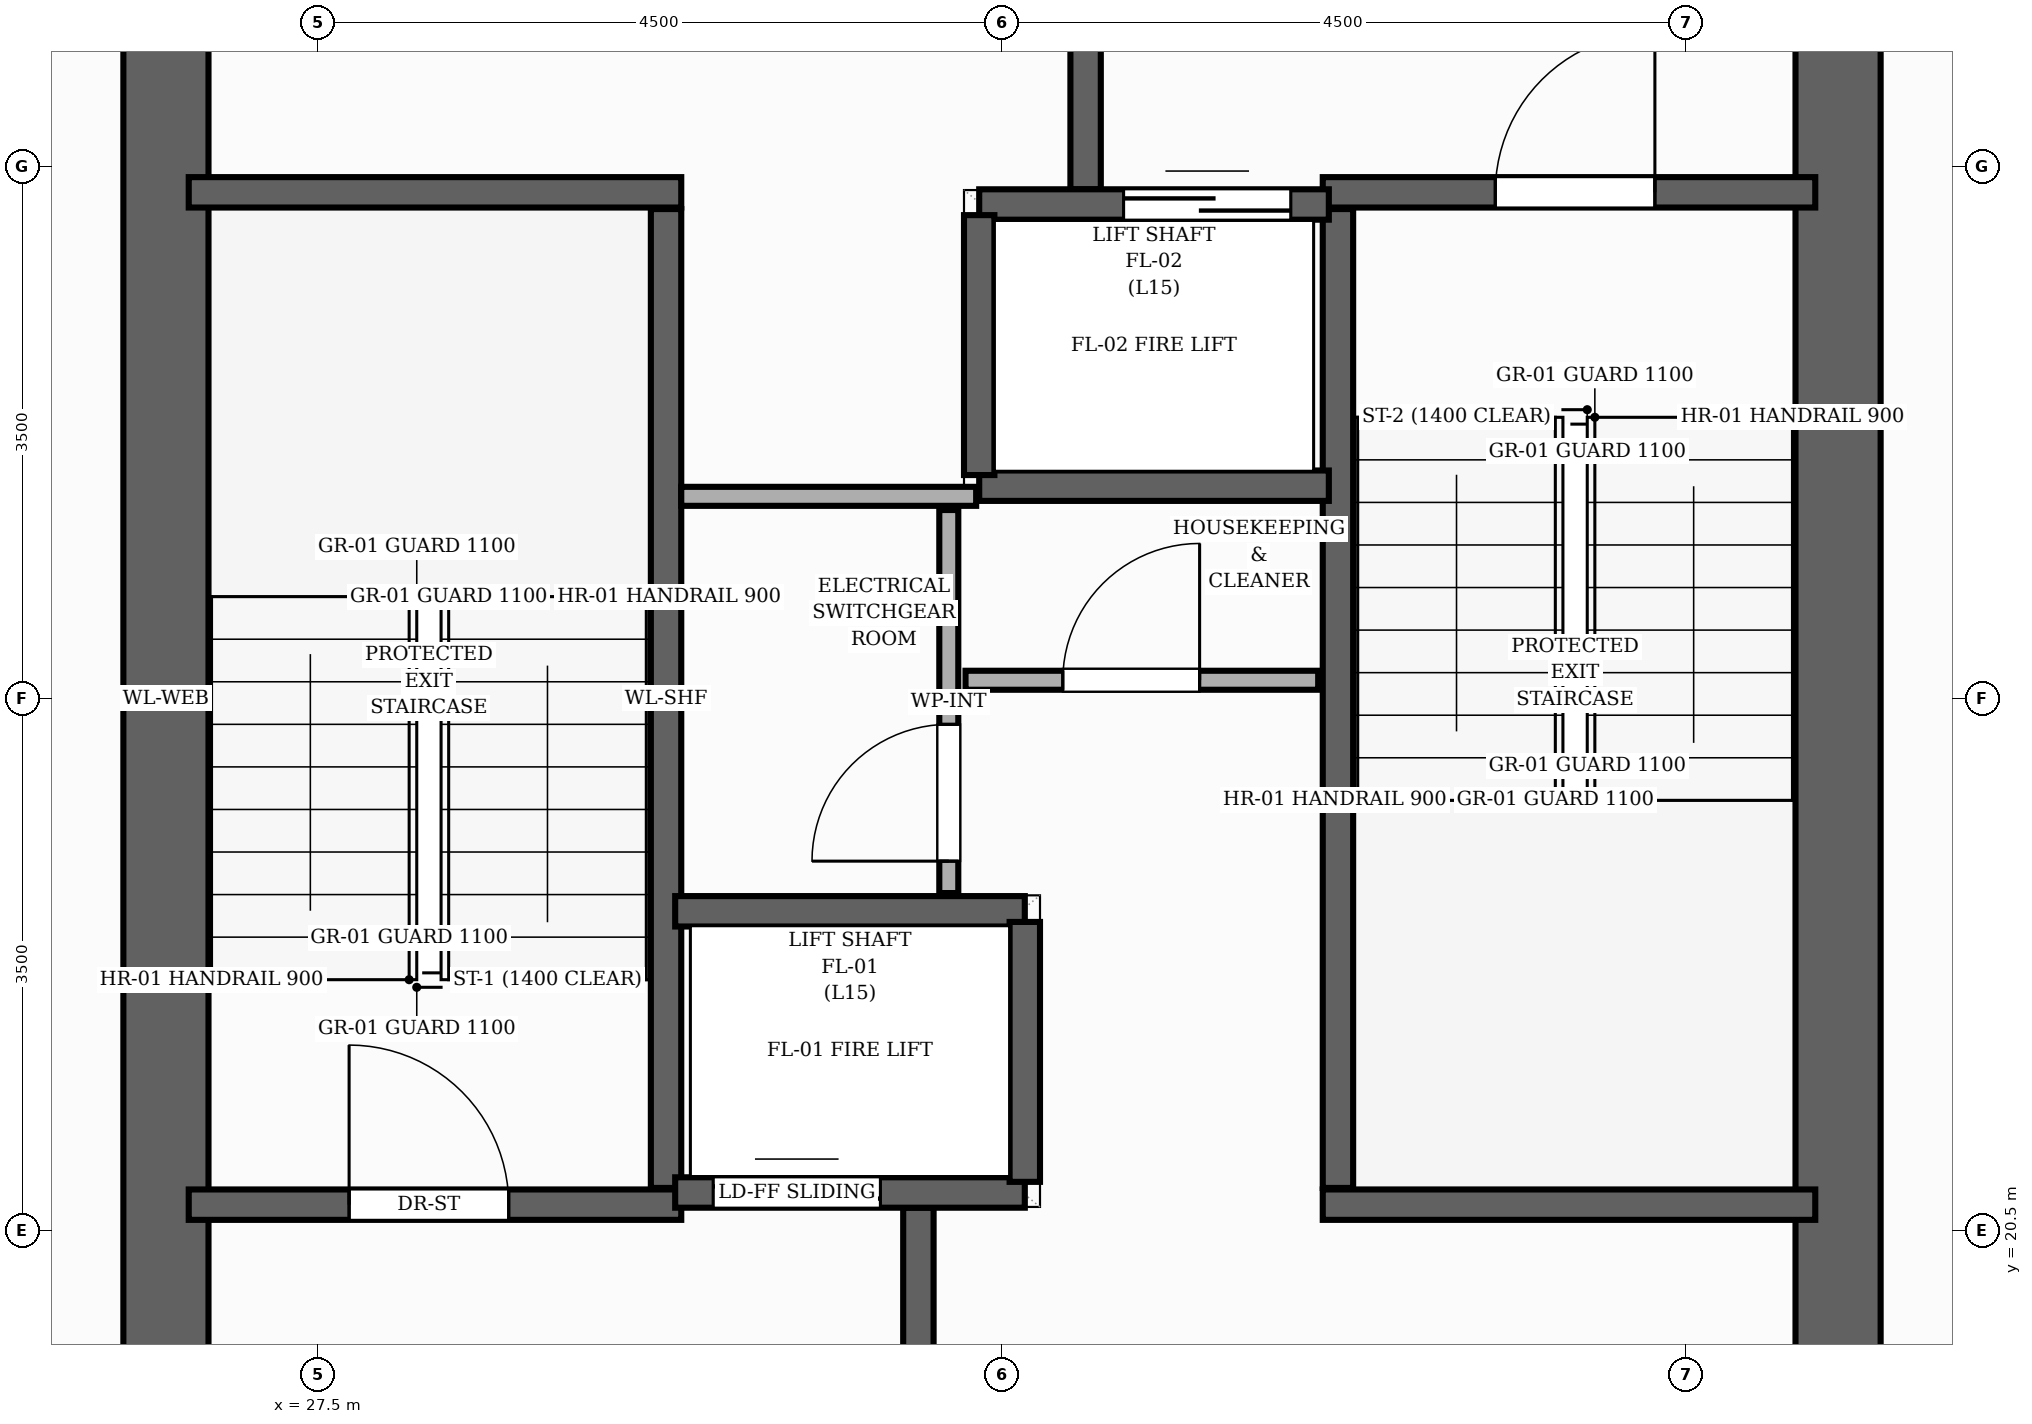
"""IFC4 building model, lengths in metres.
Left out: names, types, materials, properties, quantities, classifications, styles, units other than length and angle.
Written with IfcOpenShell. Run it as: python <this file> out.ifc"""

import sys

from ifc_helpers import new_model, si_unit, direction, frame, frame_2d, origin, place, context, subcontext, project, spatial, rectangle, extrude, element, fill, save


model = new_model("IFC4")
c1 = context("Model", 3, precision=1e-05, world=origin(), true_north=direction((0.0, 1.0)))
c2 = subcontext(c1, "Body", "Model", "MODEL_VIEW")
j1 = project(units=[si_unit("LENGTHUNIT", "METRE"), si_unit("PLANEANGLEUNIT", "RADIAN")], contexts=[c1])
p1 = place(None, origin())
s1 = spatial("IfcSite", under=j1, at=p1, CompositionType="ELEMENT")
p2 = place(p1, origin())
s2 = spatial("IfcBuilding", under=s1, at=p2, CompositionType="ELEMENT")
p3 = place(p2, frame((0.0, 0.0, 53.6)))
s3 = spatial("IfcBuildingStorey", under=s2, at=p3, CompositionType="ELEMENT", Elevation=53.6)
for number, where, z_axis, x_axis in (
    (1, (26.5, 17.4, 0.0), (0.0, 0.0, 1.0), (0.0, 1.0, 0.0)),
    (2, (37.5, 17.4, 0.0), (0.0, 0.0, 1.0), (0.0, 1.0, 0.0)),
):
    element("IfcWall", number, at=place(p3, frame(where, z_axis=z_axis, x_axis=x_axis)), inside=s3, PredefinedType="SHEAR", context=c2, shape_type="SweptSolid", body=[
        extrude(rectangle(XDim=13.2, YDim=0.56, at=frame_2d((6.6, 0.0))), origin(), (0.0, 0.0, 1.0), 3.2),
    ])
p4 = place(p3, frame((29.79, 20.78, 0.0), z_axis=(0.0, 0.0, 1.0), x_axis=(0.0, 1.0, 0.0)))
e3 = element("IfcWall", 3, at=p4, inside=s3, PredefinedType="SHEAR", context=c2, shape_type="SweptSolid", body=[
    extrude(rectangle(XDim=6.44, YDim=0.2, at=frame_2d((3.22, 0.0))), origin(), (0.0, 0.0, 1.0), 3.2),
])
p5 = place(p3, frame((26.65, 27.33, 0.0), z_axis=(0.0, 0.0, 1.0), x_axis=(1.0, 0.0, 0.0)))
e4 = element("IfcWall", 4, at=p5, inside=s3, PredefinedType="SHEAR", context=c2, shape_type="SweptSolid", body=[
    extrude(rectangle(XDim=3.24, YDim=0.2, at=frame_2d((1.62, 0.0))), origin(), (0.0, 0.0, 1.0), 3.2),
])
p6 = place(p3, frame((26.65, 20.67, 0.0), z_axis=(0.0, 0.0, 1.0), x_axis=(1.0, 0.0, 0.0)))
e5 = element("IfcWall", 5, at=p6, inside=s3, PredefinedType="SHEAR", context=c2, shape_type="SweptSolid", body=[
    extrude(rectangle(XDim=3.24, YDim=0.2, at=frame_2d((1.62, 0.0))), origin(), (0.0, 0.0, 1.0), 3.2),
])
p7 = place(p6, frame((1.055, 0.0, 0.0)))
e6 = element("IfcOpeningElement", 6, at=p7, cuts=e5, PredefinedType="OPENING", context=c2, shape_type="SweptSolid", body=[
    extrude(rectangle(XDim=1.05, YDim=2.15, at=frame_2d((0.525, 1.075))), frame((0.0, 0.11, 0.0), z_axis=(0.0, -1.0, 0.0), x_axis=(1.0, 0.0, 0.0)), (0.0, 0.0, 1.0), 0.22),
])
p8 = place(p3, frame((34.21, 20.78, 0.0), z_axis=(0.0, 0.0, 1.0), x_axis=(0.0, 1.0, 0.0)))
e7 = element("IfcWall", 7, at=p8, inside=s3, PredefinedType="SHEAR", context=c2, shape_type="SweptSolid", body=[
    extrude(rectangle(XDim=6.44, YDim=0.2, at=frame_2d((3.22, 0.0))), origin(), (0.0, 0.0, 1.0), 3.2),
])
p9 = place(p3, frame((34.11, 20.67, 0.0), z_axis=(0.0, 0.0, 1.0), x_axis=(1.0, 0.0, 0.0)))
e8 = element("IfcWall", 8, at=p9, inside=s3, PredefinedType="SHEAR", context=c2, shape_type="SweptSolid", body=[
    extrude(rectangle(XDim=3.24, YDim=0.2, at=frame_2d((1.62, 0.0))), origin(), (0.0, 0.0, 1.0), 3.2),
])
p10 = place(p3, frame((34.11, 27.33, 0.0), z_axis=(0.0, 0.0, 1.0), x_axis=(1.0, 0.0, 0.0)))
e9 = element("IfcWall", 9, at=p10, inside=s3, PredefinedType="SHEAR", context=c2, shape_type="SweptSolid", body=[
    extrude(rectangle(XDim=3.24, YDim=0.2, at=frame_2d((1.62, 0.0))), origin(), (0.0, 0.0, 1.0), 3.2),
])
p11 = place(p10, frame((1.135, 0.0, 0.0)))
e10 = element("IfcOpeningElement", 10, at=p11, cuts=e9, PredefinedType="OPENING", context=c2, shape_type="SweptSolid", body=[
    extrude(rectangle(XDim=1.05, YDim=2.15, at=frame_2d((0.525, 1.075))), frame((0.0, 0.11, 0.0), z_axis=(0.0, -1.0, 0.0), x_axis=(1.0, 0.0, 0.0)), (0.0, 0.0, 1.0), 0.22),
])
for number, where, z_axis, x_axis in (
    (11, (31.45, 17.15, 0.0), (0.0, 0.0, 1.0), (0.0, 1.0, 0.0)),
    (12, (32.55, 27.35, 0.0), (0.0, 0.0, 1.0), (0.0, 1.0, 0.0)),
):
    element("IfcWall", number, at=place(p3, frame(where, z_axis=z_axis, x_axis=x_axis)), inside=s3, PredefinedType="SHEAR", context=c2, shape_type="SweptSolid", body=[
        extrude(rectangle(XDim=3.5, YDim=0.2, at=frame_2d((1.75, 0.0))), origin(), (0.0, 0.0, 1.0), 3.2),
    ])
p12 = place(p3, frame((29.85, 20.75, 0.0), z_axis=(0.0, 0.0, 1.0), x_axis=(1.0, 0.0, 0.0)))
e13 = element("IfcWall", 13, at=p12, inside=s3, PredefinedType="SHEAR", context=c2, shape_type="SweptSolid", body=[
    extrude(rectangle(XDim=2.3, YDim=0.2, at=frame_2d((1.15, 0.0))), origin(), (0.0, 0.0, 1.0), 3.2),
])
p13 = place(p12, frame((0.25, 0.0, 0.0)))
e14 = element("IfcOpeningElement", 14, at=p13, cuts=e13, PredefinedType="OPENING", context=c2, shape_type="SweptSolid", body=[
    extrude(rectangle(XDim=1.1, YDim=2.15, at=frame_2d((0.55, 1.075))), frame((0.0, 0.11, 0.0), z_axis=(0.0, -1.0, 0.0), x_axis=(1.0, 0.0, 0.0)), (0.0, 0.0, 1.0), 0.22),
])
p14 = place(p3, frame((29.85, 22.6, 0.0), z_axis=(0.0, 0.0, 1.0), x_axis=(1.0, 0.0, 0.0)))
e15 = element("IfcWall", 15, at=p14, inside=s3, PredefinedType="SHEAR", context=c2, shape_type="SweptSolid", body=[
    extrude(rectangle(XDim=2.3, YDim=0.2, at=frame_2d((1.15, 0.0))), origin(), (0.0, 0.0, 1.0), 3.2),
])
p15 = place(p3, frame((32.15, 20.82, 0.0), z_axis=(0.0, 0.0, 1.0), x_axis=(0.0, 1.0, 0.0)))
e16 = element("IfcWall", 16, at=p15, inside=s3, PredefinedType="SHEAR", context=c2, shape_type="SweptSolid", body=[
    extrude(rectangle(XDim=1.71, YDim=0.2, at=frame_2d((0.855, 0.0))), origin(), (0.0, 0.0, 1.0), 3.2),
])
p16 = place(p3, frame((31.85, 27.25, 0.0), z_axis=(0.0, 0.0, 1.0), x_axis=(1.0, 0.0, 0.0)))
e17 = element("IfcWall", 17, at=p16, inside=s3, PredefinedType="SHEAR", context=c2, shape_type="SweptSolid", body=[
    extrude(rectangle(XDim=2.3, YDim=0.2, at=frame_2d((1.15, 0.0))), origin(), (0.0, 0.0, 1.0), 3.2),
])
p17 = place(p16, frame((0.95, 0.0, 0.0)))
e18 = element("IfcOpeningElement", 18, at=p17, cuts=e17, PredefinedType="OPENING", context=c2, shape_type="SweptSolid", body=[
    extrude(rectangle(XDim=1.1, YDim=2.15, at=frame_2d((0.55, 1.075))), frame((0.0, 0.11, 0.0), z_axis=(0.0, -1.0, 0.0), x_axis=(1.0, 0.0, 0.0)), (0.0, 0.0, 1.0), 0.22),
])
p18 = place(p3, frame((31.85, 25.4, 0.0), z_axis=(0.0, 0.0, 1.0), x_axis=(1.0, 0.0, 0.0)))
e19 = element("IfcWall", 19, at=p18, inside=s3, PredefinedType="SHEAR", context=c2, shape_type="SweptSolid", body=[
    extrude(rectangle(XDim=2.3, YDim=0.2, at=frame_2d((1.15, 0.0))), origin(), (0.0, 0.0, 1.0), 3.2),
])
p19 = place(p3, frame((31.85, 25.47, 0.0), z_axis=(0.0, 0.0, 1.0), x_axis=(0.0, 1.0, 0.0)))
e20 = element("IfcWall", 20, at=p19, inside=s3, PredefinedType="SHEAR", context=c2, shape_type="SweptSolid", body=[
    extrude(rectangle(XDim=1.71, YDim=0.2, at=frame_2d((0.855, 0.0))), origin(), (0.0, 0.0, 1.0), 3.2),
])
p20 = place(p3, frame((31.65, 22.72, 0.0), z_axis=(0.0, 0.0, 1.0), x_axis=(0.0, 1.0, 0.0)))
e21 = element("IfcWall", 21, at=p20, inside=s3, PredefinedType="PARTITIONING", context=c2, shape_type="SweptSolid", body=[
    extrude(rectangle(XDim=2.52, YDim=0.125, at=frame_2d((1.26, 0.0))), origin(), (0.0, 0.0, 1.0), 2.955),
])
p21 = place(p20, frame((0.21, 0.0, 0.0)))
e22 = element("IfcOpeningElement", 22, at=p21, cuts=e21, PredefinedType="OPENING", context=c2, shape_type="SweptSolid", body=[
    extrude(rectangle(XDim=0.9, YDim=2.1, at=frame_2d((0.45, 1.05))), frame((0.0, 0.073, 0.0), z_axis=(0.0, -1.0, 0.0), x_axis=(1.0, 0.0, 0.0)), (0.0, 0.0, 1.0), 0.145),
])
p22 = place(p3, frame((31.76, 24.12, 0.0), z_axis=(0.0, 0.0, 1.0), x_axis=(1.0, 0.0, 0.0)))
e23 = element("IfcWall", 23, at=p22, inside=s3, PredefinedType="PARTITIONING", context=c2, shape_type="SweptSolid", body=[
    extrude(rectangle(XDim=2.32, YDim=0.125, at=frame_2d((1.16, 0.0))), origin(), (0.0, 0.0, 1.0), 2.955),
])
p23 = place(p22, frame((0.64, 0.0, 0.0)))
e24 = element("IfcOpeningElement", 24, at=p23, cuts=e23, PredefinedType="OPENING", context=c2, shape_type="SweptSolid", body=[
    extrude(rectangle(XDim=0.9, YDim=2.1, at=frame_2d((0.45, 1.05))), frame((0.0, 0.073, 0.0), z_axis=(0.0, -1.0, 0.0), x_axis=(1.0, 0.0, 0.0)), (0.0, 0.0, 1.0), 0.145),
])
p24 = place(p3, frame((29.89, 25.33, 0.0), z_axis=(0.0, 0.0, 1.0), x_axis=(1.0, 0.0, 0.0)))
e25 = element("IfcWall", 25, at=p24, inside=s3, PredefinedType="PARTITIONING", context=c2, shape_type="SweptSolid", body=[
    extrude(rectangle(XDim=1.94, YDim=0.125, at=frame_2d((0.97, 0.0))), origin(), (0.0, 0.0, 1.0), 2.955),
])
p25 = place(p7, origin())
e26 = element("IfcDoor", 26, at=p25, inside=s3, OperationType="SINGLE_SWING_LEFT", PredefinedType="DOOR", context=c2, shape_type="SweptSolid", body=[
    extrude(rectangle(XDim=1.05, YDim=2.15, at=frame_2d((0.525, 1.075))), frame((0.0, 0.025, 0.0), z_axis=(0.0, -1.0, 0.0), x_axis=(1.0, 0.0, 0.0)), (0.0, 0.0, 1.0), 0.05),
])
fill(e6, e26)
p26 = place(p11, origin())
e27 = element("IfcDoor", 27, at=p26, inside=s3, OperationType="SINGLE_SWING_RIGHT", PredefinedType="DOOR", context=c2, shape_type="SweptSolid", body=[
    extrude(rectangle(XDim=1.05, YDim=2.15, at=frame_2d((0.525, 1.075))), frame((0.0, 0.025, 0.0), z_axis=(0.0, -1.0, 0.0), x_axis=(1.0, 0.0, 0.0)), (0.0, 0.0, 1.0), 0.05),
])
fill(e10, e27)
p27 = place(p13, origin())
e28 = element("IfcDoor", 28, at=p27, inside=s3, OperationType="DOUBLE_DOOR_SLIDING", PredefinedType="DOOR", context=c2, shape_type="SweptSolid", body=[
    extrude(rectangle(XDim=1.1, YDim=2.15, at=frame_2d((0.55, 1.075))), frame((0.0, 0.025, 0.0), z_axis=(0.0, -1.0, 0.0), x_axis=(1.0, 0.0, 0.0)), (0.0, 0.0, 1.0), 0.05),
])
fill(e14, e28)
p28 = place(p17, origin())
e29 = element("IfcDoor", 29, at=p28, inside=s3, OperationType="DOUBLE_DOOR_SLIDING", PredefinedType="DOOR", context=c2, shape_type="SweptSolid", body=[
    extrude(rectangle(XDim=1.1, YDim=2.15, at=frame_2d((0.55, 1.075))), frame((0.0, 0.025, 0.0), z_axis=(0.0, -1.0, 0.0), x_axis=(1.0, 0.0, 0.0)), (0.0, 0.0, 1.0), 0.05),
])
fill(e18, e29)
p29 = place(p21, origin())
e30 = element("IfcDoor", 30, at=p29, inside=s3, OperationType="SINGLE_SWING_LEFT", PredefinedType="DOOR", context=c2, shape_type="SweptSolid", body=[
    extrude(rectangle(XDim=0.9, YDim=2.1, at=frame_2d((0.45, 1.05))), frame((0.0, 0.025, 0.0), z_axis=(0.0, -1.0, 0.0), x_axis=(1.0, 0.0, 0.0)), (0.0, 0.0, 1.0), 0.05),
])
fill(e22, e30)
p30 = place(p23, origin())
e31 = element("IfcDoor", 31, at=p30, inside=s3, OperationType="SINGLE_SWING_RIGHT", PredefinedType="DOOR", context=c2, shape_type="SweptSolid", body=[
    extrude(rectangle(XDim=0.9, YDim=2.1, at=frame_2d((0.45, 1.05))), frame((0.0, 0.025, 0.0), z_axis=(0.0, -1.0, 0.0), x_axis=(1.0, 0.0, 0.0)), (0.0, 0.0, 1.0), 0.05),
])
fill(e24, e31)
save(model, sys.argv[1])
